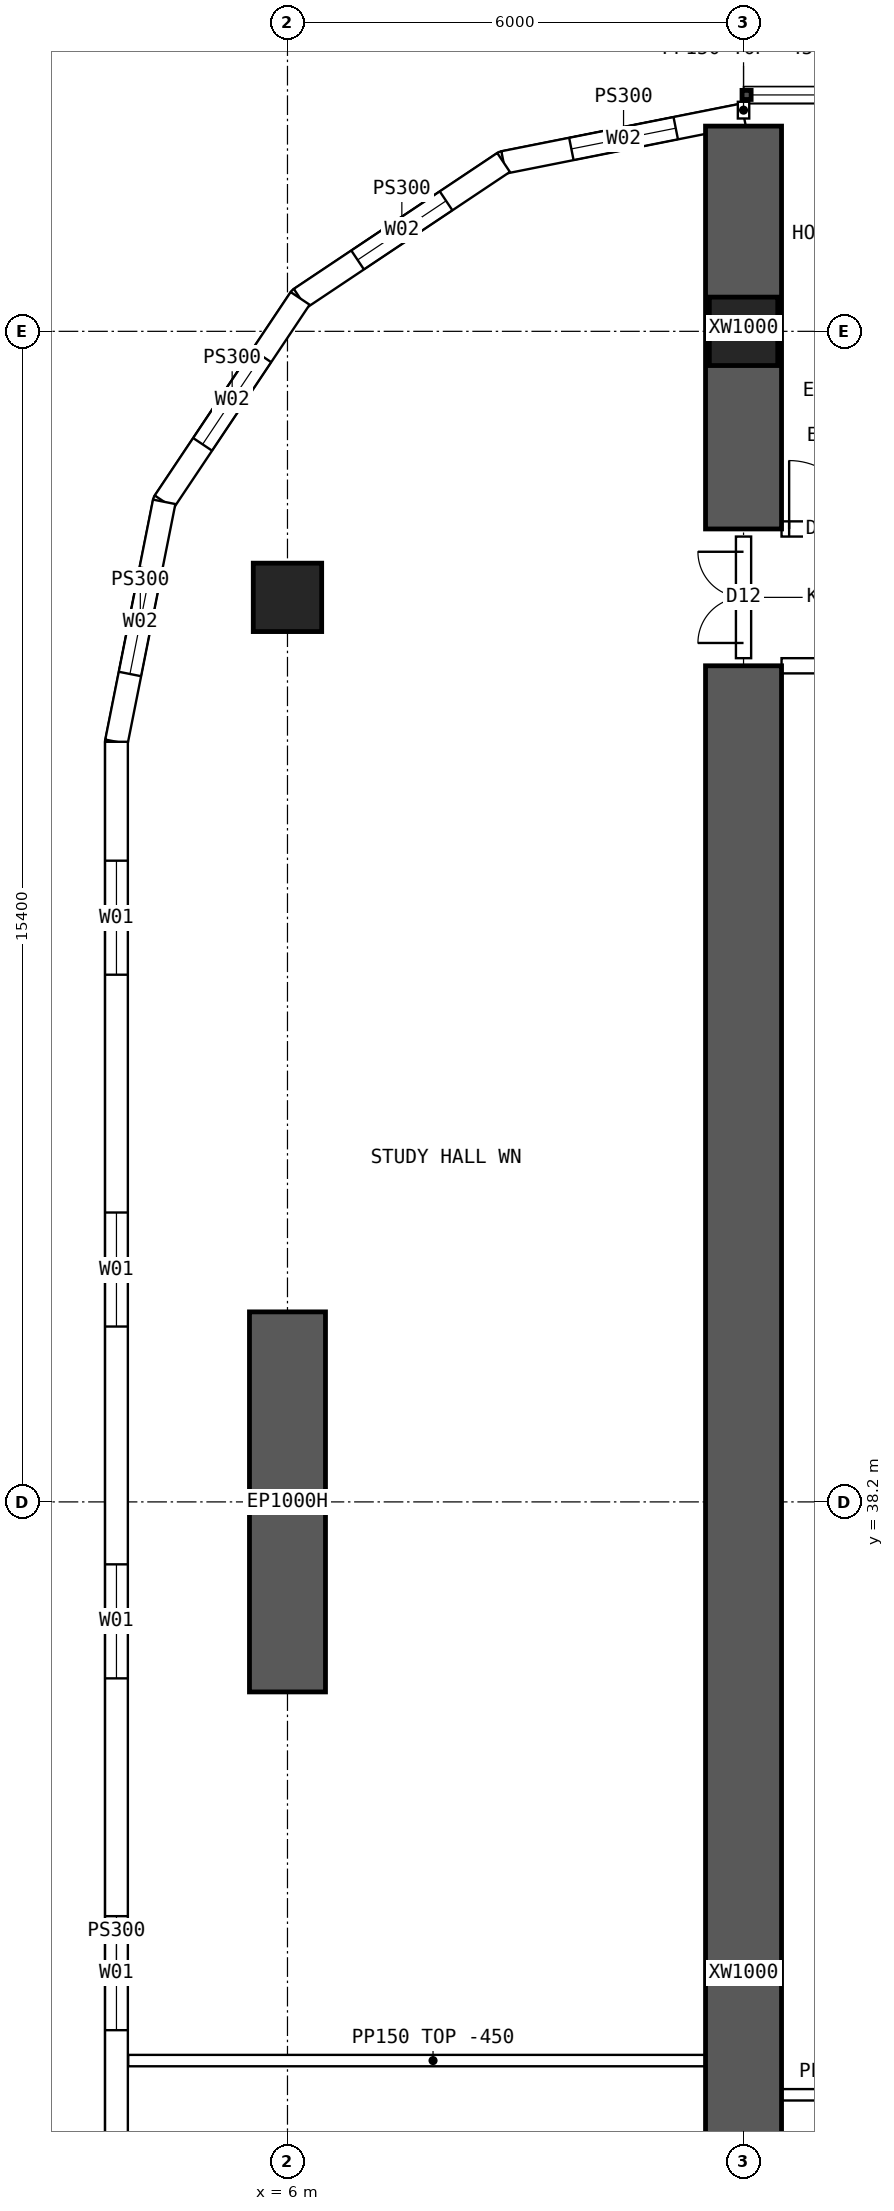
"""IFC4 building model, lengths in metres.
Left out: names, types, materials, properties, quantities, classifications, styles, units other than length and angle.
Written with IfcOpenShell. Run it as: python <this file> out.ifc"""

import sys

from ifc_helpers import new_model, si_unit, direction, frame, frame_2d, origin, origin_2d, place, context, subcontext, project, spatial, polyline, rectangle, hollow_rectangle, outline, extrude, element, fill, save


model = new_model("IFC4")
c1 = context("Model", 3, precision=1e-05, world=origin(), true_north=direction((0.0, 1.0)))
c2 = subcontext(c1, "Body", "Model", "MODEL_VIEW")
j1 = project(units=[si_unit("LENGTHUNIT", "METRE"), si_unit("PLANEANGLEUNIT", "RADIAN")], contexts=[c1])
p1 = place(None, origin())
s1 = spatial("IfcSite", under=j1, at=p1, CompositionType="ELEMENT")
p2 = place(p1, origin())
s2 = spatial("IfcBuilding", under=s1, at=p2, CompositionType="ELEMENT")
p3 = place(p2, frame((0.0, 0.0, 35.2)))
s3 = spatial("IfcBuildingStorey", under=s2, at=p3, CompositionType="ELEMENT", Elevation=35.2)
for number, where, z_axis, x_axis in (
    (1, (12.0, 53.6, 0.0), (0.0, 0.0, 1.0), (1.0, 0.0, 0.0)),
    (2, (6.0, 50.1, 0.0), (0.0, 0.0, 1.0), (1.0, 0.0, 0.0)),
):
    element("IfcColumn", number, at=place(p3, frame(where, z_axis=z_axis, x_axis=x_axis)), inside=s3, PredefinedType="COLUMN", context=c2, shape_type="SweptSolid", body=[
        extrude(hollow_rectangle(XDim=0.9, YDim=0.9, WallThickness=0.09, at=origin_2d()), origin(), (0.0, 0.0, 1.0), 3.75),
    ])
p4 = place(p3, frame((6.0, 35.7, 0.0), z_axis=(0.0, 0.0, 1.0), x_axis=(0.0, 1.0, 0.0)))
e3 = element("IfcWall", 3, at=p4, inside=s3, PredefinedType="SHEAR", context=c2, shape_type="SweptSolid", body=[
    extrude(rectangle(XDim=5.0, YDim=1.0, at=frame_2d((2.5, 0.0))), origin(), (0.0, 0.0, 1.0), 3.75),
])
p5 = place(p3, frame((12.0, 51.0, 0.0), z_axis=(0.0, 0.0, 1.0), x_axis=(0.0, 1.0, 0.0)))
e4 = element("IfcWall", 4, at=p5, inside=s3, PredefinedType="SHEAR", context=c2, shape_type="SweptSolid", body=[
    extrude(rectangle(XDim=5.3, YDim=1.0, at=frame_2d((2.65, 0.0))), origin(), (0.0, 0.0, 1.0), 3.75),
])
p6 = place(p3, frame((12.0, 14.8, 0.0), z_axis=(0.0, 0.0, 1.0), x_axis=(0.0, 1.0, 0.0)))
e5 = element("IfcWall", 5, at=p6, inside=s3, PredefinedType="SHEAR", context=c2, shape_type="SweptSolid", body=[
    extrude(rectangle(XDim=34.4, YDim=1.0, at=frame_2d((17.2, 0.0))), origin(), (0.0, 0.0, 1.0), 3.75),
])
p7 = place(p3, frame((3.75, 48.2, 0.0), z_axis=(0.0, 0.0, 1.0), x_axis=(0.0, -1.0, 0.0)))
e6 = element("IfcWall", 6, at=p7, inside=s3, PredefinedType="SOLIDWALL", context=c2, shape_type="SweptSolid", body=[
    extrude(outline(polyline([(-0.015, -0.15), (32.415, -0.15), (32.385, 0.15), (0.015, 0.15), (-0.015, -0.15)])), origin(), (0.0, 0.0, 1.0), 3.3),
])
p8 = place(p7, frame((1.564, 0.0, 0.9)))
e7 = element("IfcOpeningElement", 7, at=p8, cuts=e6, PredefinedType="OPENING", context=c2, shape_type="SweptSolid", body=[
    extrude(rectangle(XDim=1.5, YDim=2.0, at=frame_2d((0.75, 1.0))), frame((0.0, 0.16, 0.0), z_axis=(0.0, -1.0, 0.0), x_axis=(1.0, 0.0, 0.0)), (0.0, 0.0, 1.0), 0.32),
])
p9 = place(p7, frame((6.193, 0.0, 0.9)))
e8 = element("IfcOpeningElement", 8, at=p9, cuts=e6, PredefinedType="OPENING", context=c2, shape_type="SweptSolid", body=[
    extrude(rectangle(XDim=1.5, YDim=2.0, at=frame_2d((0.75, 1.0))), frame((0.0, 0.16, 0.0), z_axis=(0.0, -1.0, 0.0), x_axis=(1.0, 0.0, 0.0)), (0.0, 0.0, 1.0), 0.32),
])
p10 = place(p7, frame((10.822, 0.0, 0.9)))
e9 = element("IfcOpeningElement", 9, at=p10, cuts=e6, PredefinedType="OPENING", context=c2, shape_type="SweptSolid", body=[
    extrude(rectangle(XDim=1.5, YDim=2.0, at=frame_2d((0.75, 1.0))), frame((0.0, 0.16, 0.0), z_axis=(0.0, -1.0, 0.0), x_axis=(1.0, 0.0, 0.0)), (0.0, 0.0, 1.0), 0.32),
])
p11 = place(p7, frame((15.45, 0.0, 0.9)))
e10 = element("IfcOpeningElement", 10, at=p11, cuts=e6, PredefinedType="OPENING", context=c2, shape_type="SweptSolid", body=[
    extrude(rectangle(XDim=1.5, YDim=2.0, at=frame_2d((0.75, 1.0))), frame((0.0, 0.16, 0.0), z_axis=(0.0, -1.0, 0.0), x_axis=(1.0, 0.0, 0.0)), (0.0, 0.0, 1.0), 0.32),
])
p12 = place(p7, frame((20.079, 0.0, 0.9)))
e11 = element("IfcOpeningElement", 11, at=p12, cuts=e6, PredefinedType="OPENING", context=c2, shape_type="SweptSolid", body=[
    extrude(rectangle(XDim=1.5, YDim=2.0, at=frame_2d((0.75, 1.0))), frame((0.0, 0.16, 0.0), z_axis=(0.0, -1.0, 0.0), x_axis=(1.0, 0.0, 0.0)), (0.0, 0.0, 1.0), 0.32),
])
p13 = place(p7, frame((24.707, 0.0, 0.9)))
e12 = element("IfcOpeningElement", 12, at=p13, cuts=e6, PredefinedType="OPENING", context=c2, shape_type="SweptSolid", body=[
    extrude(rectangle(XDim=1.5, YDim=2.0, at=frame_2d((0.75, 1.0))), frame((0.0, 0.16, 0.0), z_axis=(0.0, -1.0, 0.0), x_axis=(1.0, 0.0, 0.0)), (0.0, 0.0, 1.0), 0.32),
])
p14 = place(p7, frame((29.336, 0.0, 0.9)))
e13 = element("IfcOpeningElement", 13, at=p14, cuts=e6, PredefinedType="OPENING", context=c2, shape_type="SweptSolid", body=[
    extrude(rectangle(XDim=1.5, YDim=2.0, at=frame_2d((0.75, 1.0))), frame((0.0, 0.16, 0.0), z_axis=(0.0, -1.0, 0.0), x_axis=(1.0, 0.0, 0.0)), (0.0, 0.0, 1.0), 0.32),
])
p15 = place(p3, frame((12.0, 56.45, 0.0), z_axis=(0.0, 0.0, 1.0), x_axis=(-0.980787251524, -0.195080412259, 0.0)))
e14 = element("IfcWall", 14, at=p15, inside=s3, PredefinedType="SOLIDWALL", context=c2, shape_type="SweptSolid", body=[
    extrude(outline(polyline([(-0.03, -0.15), (3.249, -0.15), (3.189, 0.15), (0.03, 0.15), (-0.03, -0.15)])), origin(), (0.0, 0.0, 1.0), 3.3),
])
p16 = place(p15, frame((0.909, 0.0, 0.9)))
e15 = element("IfcOpeningElement", 15, at=p16, cuts=e14, PredefinedType="OPENING", context=c2, shape_type="SweptSolid", body=[
    extrude(rectangle(XDim=1.4, YDim=1.8, at=frame_2d((0.7, 0.9))), frame((0.0, 0.16, 0.0), z_axis=(0.0, -1.0, 0.0), x_axis=(1.0, 0.0, 0.0)), (0.0, 0.0, 1.0), 0.32),
])
p17 = place(p3, frame((8.843, 55.822, 0.0), z_axis=(0.0, 0.0, 1.0), x_axis=(-0.831478105043, -0.555557522525, 0.0)))
e16 = element("IfcWall", 16, at=p17, inside=s3, PredefinedType="SOLIDWALL", context=c2, shape_type="SweptSolid", body=[
    extrude(outline(polyline([(-0.03, -0.15), (3.249, -0.15), (3.189, 0.15), (0.03, 0.15), (-0.03, -0.15)])), origin(), (0.0, 0.0, 1.0), 3.3),
])
p18 = place(p17, frame((0.909, 0.0, 0.9)))
e17 = element("IfcOpeningElement", 17, at=p18, cuts=e16, PredefinedType="OPENING", context=c2, shape_type="SweptSolid", body=[
    extrude(rectangle(XDim=1.4, YDim=1.8, at=frame_2d((0.7, 0.9))), frame((0.0, 0.16, 0.0), z_axis=(0.0, -1.0, 0.0), x_axis=(1.0, 0.0, 0.0)), (0.0, 0.0, 1.0), 0.32),
])
p19 = place(p3, frame((6.167, 54.034, 0.0), z_axis=(0.0, 0.0, 1.0), x_axis=(-0.555609954424, -0.831443069936, 0.0)))
e18 = element("IfcWall", 18, at=p19, inside=s3, PredefinedType="SOLIDWALL", context=c2, shape_type="SweptSolid", body=[
    extrude(outline(polyline([(-0.03, -0.15), (3.249, -0.15), (3.189, 0.15), (0.03, 0.15), (-0.03, -0.15)])), origin(), (0.0, 0.0, 1.0), 3.3),
])
p20 = place(p19, frame((0.909, 0.0, 0.9)))
e19 = element("IfcOpeningElement", 19, at=p20, cuts=e18, PredefinedType="OPENING", context=c2, shape_type="SweptSolid", body=[
    extrude(rectangle(XDim=1.4, YDim=1.8, at=frame_2d((0.7, 0.9))), frame((0.0, 0.16, 0.0), z_axis=(0.0, -1.0, 0.0), x_axis=(1.0, 0.0, 0.0)), (0.0, 0.0, 1.0), 0.32),
])
p21 = place(p3, frame((4.378, 51.357, 0.0), z_axis=(0.0, 0.0, 1.0), x_axis=(-0.195065901187, -0.980790137692, 0.0)))
e20 = element("IfcWall", 20, at=p21, inside=s3, PredefinedType="SOLIDWALL", context=c2, shape_type="SweptSolid", body=[
    extrude(outline(polyline([(-0.03, -0.15), (3.234, -0.15), (3.204, 0.15), (0.03, 0.15), (-0.03, -0.15)])), origin(), (0.0, 0.0, 1.0), 3.3),
])
p22 = place(p21, frame((0.909, 0.0, 0.9)))
e21 = element("IfcOpeningElement", 21, at=p22, cuts=e20, PredefinedType="OPENING", context=c2, shape_type="SweptSolid", body=[
    extrude(rectangle(XDim=1.4, YDim=1.8, at=frame_2d((0.7, 0.9))), frame((0.0, 0.16, 0.0), z_axis=(0.0, -1.0, 0.0), x_axis=(1.0, 0.0, 0.0)), (0.0, 0.0, 1.0), 0.32),
])
p23 = place(p3, frame((12.5, 51.0, 0.0), z_axis=(0.0, 0.0, 1.0), x_axis=(1.0, 0.0, 0.0)))
e22 = element("IfcWall", 22, at=p23, inside=s3, PredefinedType="SOLIDWALL", context=c2, shape_type="SweptSolid", body=[
    extrude(outline(polyline([(0.0, 0.0), (5.0, 0.0), (5.0, 2.9), (0.0, 2.9), (0.0, 0.0)])), frame((0.0, 0.1, 0.0), z_axis=(0.0, -1.0, 0.0), x_axis=(1.0, 0.0, 0.0)), (0.0, 0.0, 1.0), 0.2),
])
p24 = place(p23, frame((0.1, 0.0, 0.0)))
e23 = element("IfcOpeningElement", 23, at=p24, cuts=e22, PredefinedType="OPENING", context=c2, shape_type="SweptSolid", body=[
    extrude(rectangle(XDim=0.9, YDim=2.1, at=frame_2d((0.45, 1.05))), frame((0.0, 0.11, 0.0), z_axis=(0.0, -1.0, 0.0), x_axis=(1.0, 0.0, 0.0)), (0.0, 0.0, 1.0), 0.22),
])
p25 = place(p23, frame((4.0, 0.0, 0.0)))
e24 = element("IfcOpeningElement", 24, at=p25, cuts=e22, PredefinedType="OPENING", context=c2, shape_type="SweptSolid", body=[
    extrude(rectangle(XDim=0.9, YDim=2.1, at=frame_2d((0.45, 1.05))), frame((0.0, 0.11, 0.0), z_axis=(0.0, -1.0, 0.0), x_axis=(1.0, 0.0, 0.0)), (0.0, 0.0, 1.0), 0.22),
])
p26 = place(p3, frame((12.5, 49.2, 0.0), z_axis=(0.0, 0.0, 1.0), x_axis=(1.0, 0.0, 0.0)))
e25 = element("IfcWall", 25, at=p26, inside=s3, PredefinedType="SOLIDWALL", context=c2, shape_type="SweptSolid", body=[
    extrude(rectangle(XDim=5.0, YDim=0.2, at=frame_2d((2.5, 0.0))), origin(), (0.0, 0.0, 1.0), 3.3),
])
p27 = place(p26, frame((3.3, 0.0, 0.0)))
e26 = element("IfcOpeningElement", 26, at=p27, cuts=e25, PredefinedType="OPENING", context=c2, shape_type="SweptSolid", body=[
    extrude(rectangle(XDim=1.6, YDim=2.1, at=frame_2d((0.8, 1.05))), frame((0.0, 0.11, 0.0), z_axis=(0.0, -1.0, 0.0), x_axis=(1.0, 0.0, 0.0)), (0.0, 0.0, 1.0), 0.22),
])
p28 = place(p3, frame((12.0, 30.4, 0.0), z_axis=(0.0, 0.0, 1.0), x_axis=(1.0, 0.0, 0.0)))
e27 = element("IfcWall", 27, at=p28, inside=s3, PredefinedType="PARTITIONING", context=c2, shape_type="SweptSolid", body=[
    extrude(rectangle(XDim=3.6, YDim=0.15, at=frame_2d((1.8, 0.0))), origin(), (0.0, 0.0, 1.0), 3.3),
])
p29 = place(p3, frame((3.905, 30.85, 0.0), z_axis=(0.0, 0.0, 1.0), x_axis=(1.0, 0.0, 0.0)))
e28 = element("IfcWall", 28, at=p29, inside=s3, PredefinedType="PARTITIONING", context=c2, shape_type="SweptSolid", body=[
    extrude(outline(polyline([(0.0, 0.0), (8.02, 0.0), (8.02, 3.3), (2.397, 3.3), (2.395, 2.85), (1.797, 2.85), (1.795, 3.3), (0.0, 3.3), (0.0, 0.0)])), frame((0.0, 0.075, 0.0), z_axis=(0.0, -1.0, 0.0), x_axis=(1.0, 0.0, 0.0)), (0.0, 0.0, 1.0), 0.15),
])
p30 = place(p3, frame((12.0, 49.3, 0.0), z_axis=(0.0, 0.0, 1.0), x_axis=(0.0, 1.0, 0.0)))
e29 = element("IfcWall", 29, at=p30, inside=s3, PredefinedType="SOLIDWALL", context=c2, shape_type="SweptSolid", body=[
    extrude(outline(polyline([(0.0, 0.0), (1.6, 0.0), (1.6, 2.85), (0.0, 2.85), (0.0, 0.0)])), frame((0.0, 0.1, 0.0), z_axis=(0.0, -1.0, 0.0), x_axis=(1.0, 0.0, 0.0)), (0.0, 0.0, 1.0), 0.2),
])
p31 = place(p30, frame((0.2, 0.0, 0.0)))
e30 = element("IfcOpeningElement", 30, at=p31, cuts=e29, PredefinedType="OPENING", context=c2, shape_type="SweptSolid", body=[
    extrude(rectangle(XDim=1.2, YDim=2.1, at=frame_2d((0.6, 1.05))), frame((0.0, 0.11, 0.0), z_axis=(0.0, -1.0, 0.0), x_axis=(1.0, 0.0, 0.0)), (0.0, 0.0, 1.0), 0.22),
])
p32 = place(p3, frame((12.0, 56.4, 0.0), z_axis=(0.0, 0.0, 1.0), x_axis=(0.0, 1.0, 0.0)))
e31 = element("IfcWall", 31, at=p32, inside=s3, PredefinedType="PARTITIONING", context=c2, shape_type="SweptSolid", body=[
    extrude(rectangle(XDim=0.22, YDim=0.15, at=frame_2d((0.11, 0.0))), origin(), (0.0, 0.0, 1.0), 3.3),
])
p33 = place(p8, origin())
e32 = element("IfcWindow", 32, at=p33, inside=s3, PartitioningType="SINGLE_PANEL", PredefinedType="WINDOW", context=c2, shape_type="SweptSolid", body=[
    extrude(rectangle(XDim=1.5, YDim=2.0, at=frame_2d((0.75, 1.0))), frame((0.0, 0.03, 0.0), z_axis=(0.0, -1.0, 0.0), x_axis=(1.0, 0.0, 0.0)), (0.0, 0.0, 1.0), 0.06),
])
fill(e7, e32)
p34 = place(p9, origin())
e33 = element("IfcWindow", 33, at=p34, inside=s3, PartitioningType="SINGLE_PANEL", PredefinedType="WINDOW", context=c2, shape_type="SweptSolid", body=[
    extrude(rectangle(XDim=1.5, YDim=2.0, at=frame_2d((0.75, 1.0))), frame((0.0, 0.03, 0.0), z_axis=(0.0, -1.0, 0.0), x_axis=(1.0, 0.0, 0.0)), (0.0, 0.0, 1.0), 0.06),
])
fill(e8, e33)
p35 = place(p10, origin())
e34 = element("IfcWindow", 34, at=p35, inside=s3, PartitioningType="SINGLE_PANEL", PredefinedType="WINDOW", context=c2, shape_type="SweptSolid", body=[
    extrude(rectangle(XDim=1.5, YDim=2.0, at=frame_2d((0.75, 1.0))), frame((0.0, 0.03, 0.0), z_axis=(0.0, -1.0, 0.0), x_axis=(1.0, 0.0, 0.0)), (0.0, 0.0, 1.0), 0.06),
])
fill(e9, e34)
p36 = place(p11, origin())
e35 = element("IfcWindow", 35, at=p36, inside=s3, PartitioningType="SINGLE_PANEL", PredefinedType="WINDOW", context=c2, shape_type="SweptSolid", body=[
    extrude(rectangle(XDim=1.5, YDim=2.0, at=frame_2d((0.75, 1.0))), frame((0.0, 0.03, 0.0), z_axis=(0.0, -1.0, 0.0), x_axis=(1.0, 0.0, 0.0)), (0.0, 0.0, 1.0), 0.06),
])
fill(e10, e35)
p37 = place(p16, origin())
e36 = element("IfcWindow", 36, at=p37, inside=s3, PartitioningType="SINGLE_PANEL", PredefinedType="WINDOW", context=c2, shape_type="SweptSolid", body=[
    extrude(rectangle(XDim=1.4, YDim=1.8, at=frame_2d((0.7, 0.9))), frame((0.0, 0.03, 0.0), z_axis=(0.0, -1.0, 0.0), x_axis=(1.0, 0.0, 0.0)), (0.0, 0.0, 1.0), 0.06),
])
fill(e15, e36)
p38 = place(p18, origin())
e37 = element("IfcWindow", 37, at=p38, inside=s3, PartitioningType="SINGLE_PANEL", PredefinedType="WINDOW", context=c2, shape_type="SweptSolid", body=[
    extrude(rectangle(XDim=1.4, YDim=1.8, at=frame_2d((0.7, 0.9))), frame((0.0, 0.03, 0.0), z_axis=(0.0, -1.0, 0.0), x_axis=(1.0, 0.0, 0.0)), (0.0, 0.0, 1.0), 0.06),
])
fill(e17, e37)
p39 = place(p20, origin())
e38 = element("IfcWindow", 38, at=p39, inside=s3, PartitioningType="SINGLE_PANEL", PredefinedType="WINDOW", context=c2, shape_type="SweptSolid", body=[
    extrude(rectangle(XDim=1.4, YDim=1.8, at=frame_2d((0.7, 0.9))), frame((0.0, 0.03, 0.0), z_axis=(0.0, -1.0, 0.0), x_axis=(1.0, 0.0, 0.0)), (0.0, 0.0, 1.0), 0.06),
])
fill(e19, e38)
p40 = place(p22, origin())
e39 = element("IfcWindow", 39, at=p40, inside=s3, PartitioningType="SINGLE_PANEL", PredefinedType="WINDOW", context=c2, shape_type="SweptSolid", body=[
    extrude(rectangle(XDim=1.4, YDim=1.8, at=frame_2d((0.7, 0.9))), frame((0.0, 0.03, 0.0), z_axis=(0.0, -1.0, 0.0), x_axis=(1.0, 0.0, 0.0)), (0.0, 0.0, 1.0), 0.06),
])
fill(e21, e39)
p41 = place(p24, origin())
e40 = element("IfcDoor", 40, at=p41, inside=s3, OperationType="SINGLE_SWING_LEFT", PredefinedType="DOOR", context=c2, shape_type="SweptSolid", body=[
    extrude(rectangle(XDim=0.9, YDim=2.1, at=frame_2d((0.45, 1.05))), frame((0.0, 0.025, 0.0), z_axis=(0.0, -1.0, 0.0), x_axis=(1.0, 0.0, 0.0)), (0.0, 0.0, 1.0), 0.05),
])
fill(e23, e40)
p42 = place(p31, origin())
e41 = element("IfcDoor", 41, at=p42, inside=s3, OperationType="DOUBLE_DOOR_SINGLE_SWING", PredefinedType="DOOR", context=c2, shape_type="SweptSolid", body=[
    extrude(rectangle(XDim=1.2, YDim=2.1, at=frame_2d((0.6, 1.05))), frame((0.0, 0.025, 0.0), z_axis=(0.0, -1.0, 0.0), x_axis=(1.0, 0.0, 0.0)), (0.0, 0.0, 1.0), 0.05),
])
fill(e30, e41)
save(model, sys.argv[1])
